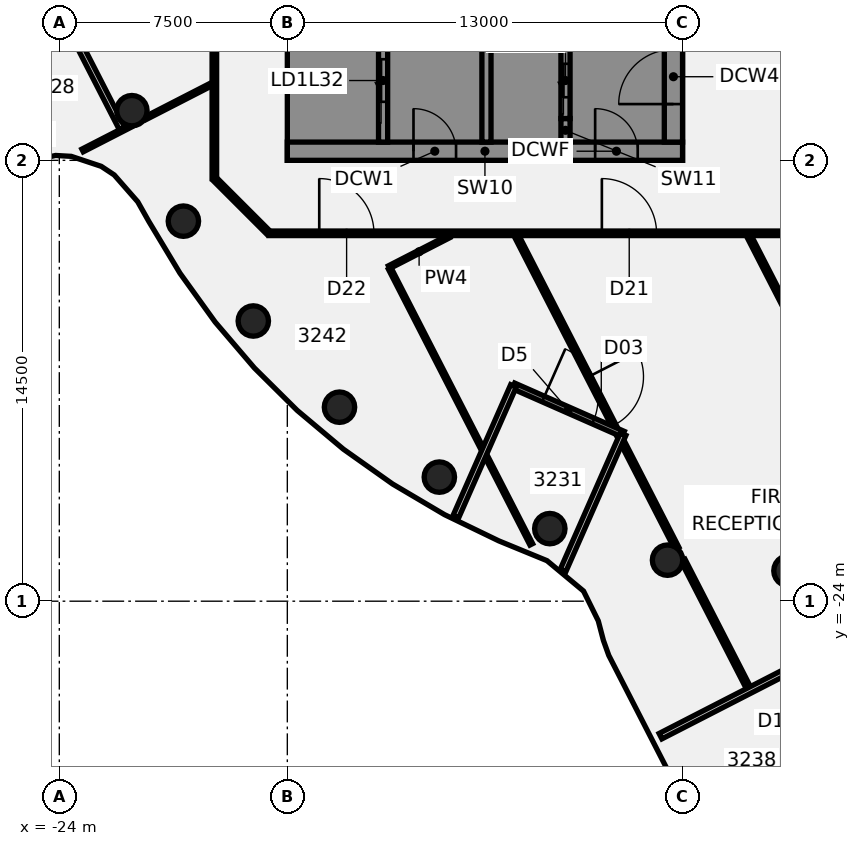
"""IFC4 building model, lengths in metres.
Left out: names, types, materials, properties, quantities, classifications, styles, units other than length and angle.
Written with IfcOpenShell. Run it as: python <this file> out.ifc"""

import sys

from ifc_helpers import new_model, si_unit, direction, frame, frame_2d, origin, origin_2d, place, context, subcontext, project, spatial, polyline, rectangle, circle, outline, extrude, element, fill, save


model = new_model("IFC4")
c1 = context("Model", 3, precision=1e-05, world=origin(), true_north=direction((0.0, 1.0)))
c2 = subcontext(c1, "Body", "Model", "MODEL_VIEW")
j1 = project(units=[si_unit("LENGTHUNIT", "METRE"), si_unit("PLANEANGLEUNIT", "RADIAN")], contexts=[c1])
p1 = place(None, origin())
s1 = spatial("IfcSite", under=j1, at=p1, CompositionType="ELEMENT")
p2 = place(p1, origin())
s2 = spatial("IfcBuilding", under=s1, at=p2, CompositionType="ELEMENT")
p3 = place(p2, frame((0.0, 0.0, 133.0)))
s3 = spatial("IfcBuildingStorey", under=s2, at=p3, CompositionType="ELEMENT", Elevation=133.0)
for number, where, z_axis, x_axis in (
    (1, (-21.613, -7.866, -0.14), (0.0, 0.0, 1.0), (1.0, 0.0, 0.0)),
    (2, (-19.919, -11.5, -0.14), (0.0, 0.0, 1.0), (1.0, 0.0, 0.0)),
    (3, (-17.619, -14.784, -0.14), (0.0, 0.0, 1.0), (1.0, 0.0, 0.0)),
    (4, (-14.784, -17.619, -0.14), (0.0, 0.0, 1.0), (1.0, 0.0, 0.0)),
    (5, (-11.5, -19.919, -0.14), (0.0, 0.0, 1.0), (1.0, 0.0, 0.0)),
    (6, (-7.866, -21.613, -0.14), (0.0, 0.0, 1.0), (1.0, 0.0, 0.0)),
    (7, (-3.994, -22.651, -0.14), (0.0, 0.0, 1.0), (1.0, 0.0, 0.0)),
    (8, (0.0, -23.0, -0.14), (0.0, 0.0, 1.0), (1.0, 0.0, 0.0)),
):
    element("IfcColumn", number, at=place(p3, frame(where, z_axis=z_axis, x_axis=x_axis)), inside=s3, PredefinedType="COLUMN", context=c2, shape_type="SweptSolid", body=[
        extrude(circle(Radius=0.5, at=origin_2d()), origin(), (0.0, 0.0, 1.0), 3.75),
    ])
p4 = place(p3, frame((-28.439, 4.225, 0.0), z_axis=(0.0, 0.0, 1.0), x_axis=(0.456564117727, -0.889690511585, 0.0)))
e9 = element("IfcWall", 9, at=p4, inside=s3, PredefinedType="PARTITIONING", context=c2, shape_type="SweptSolid", body=[
    extrude(rectangle(XDim=14.24, YDim=0.2, at=frame_2d((7.12, 0.0))), origin(), (0.0, 0.0, 1.0), 3.01),
])
p5 = place(p4, frame((5.799, 0.0, 0.0)))
e10 = element("IfcOpeningElement", 10, at=p5, cuts=e9, PredefinedType="OPENING", context=c2, shape_type="SweptSolid", body=[
    extrude(rectangle(XDim=1.4, YDim=2.1, at=frame_2d((0.7, 1.05))), frame((0.0, 0.11, 0.0), z_axis=(0.0, -1.0, 0.0), x_axis=(1.0, 0.0, 0.0)), (0.0, 0.0, 1.0), 0.22),
])
p6 = place(p3, frame((-13.13, -13.059, 0.0), z_axis=(0.0, 0.0, 1.0), x_axis=(0.456518382735, -0.88971398001, 0.0)))
e11 = element("IfcWall", 11, at=p6, inside=s3, PredefinedType="PARTITIONING", context=c2, shape_type="SweptSolid", body=[
    extrude(rectangle(XDim=10.196, YDim=0.1, at=frame_2d((5.098, 0.0))), origin(), (0.0, 0.0, 1.0), 3.01),
])
p7 = place(p3, frame((-8.956, -11.993, 0.0), z_axis=(0.0, 0.0, 1.0), x_axis=(0.456540854067, -0.889702449456, 0.0)))
e12 = element("IfcWall", 12, at=p7, inside=s3, PredefinedType="PARTITIONING", context=c2, shape_type="SweptSolid", body=[
    extrude(rectangle(XDim=11.539, YDim=0.15, at=frame_2d((5.77, 0.0))), origin(), (0.0, 0.0, 1.0), 3.01),
])
p8 = place(p7, frame((5.195, 0.0, 0.0)))
e13 = element("IfcOpeningElement", 13, at=p8, cuts=e12, PredefinedType="OPENING", context=c2, shape_type="SweptSolid", body=[
    extrude(rectangle(XDim=1.8, YDim=2.1, at=frame_2d((0.9, 1.05))), frame((0.0, 0.085, 0.0), z_axis=(0.0, -1.0, 0.0), x_axis=(1.0, 0.0, 0.0)), (0.0, 0.0, 1.0), 0.17),
])
p9 = place(p3, frame((-3.485, -22.655, 0.0), z_axis=(0.0, 0.0, 1.0), x_axis=(0.456522971759, -0.889711625335, 0.0)))
e14 = element("IfcWall", 14, at=p9, inside=s3, PredefinedType="PARTITIONING", context=c2, shape_type="SweptSolid", body=[
    extrude(rectangle(XDim=4.708, YDim=0.15, at=frame_2d((2.354, 0.0))), origin(), (0.0, 0.0, 1.0), 3.01),
])
p10 = place(p3, frame((-1.313, -11.993, 0.0), z_axis=(0.0, 0.0, 1.0), x_axis=(0.456517816725, -0.889714270433, 0.0)))
e15 = element("IfcWall", 15, at=p10, inside=s3, PredefinedType="PARTITIONING", context=c2, shape_type="SweptSolid", body=[
    extrude(rectangle(XDim=11.432, YDim=0.15, at=frame_2d((5.716, 0.0))), origin(), (0.0, 0.0, 1.0), 3.01),
])
p11 = place(p10, frame((3.645, 0.0, 0.0)))
e16 = element("IfcOpeningElement", 16, at=p11, cuts=e15, PredefinedType="OPENING", context=c2, shape_type="SweptSolid", body=[
    extrude(rectangle(XDim=0.9, YDim=2.1, at=frame_2d((0.45, 1.05))), frame((0.0, 0.085, 0.0), z_axis=(0.0, -1.0, 0.0), x_axis=(1.0, 0.0, 0.0)), (0.0, 0.0, 1.0), 0.17),
])
p12 = place(p3, frame((-18.872, -10.128, 0.0), z_axis=(0.0, 0.0, 1.0), x_axis=(0.707106781187, -0.707106781187, 0.0)))
e17 = element("IfcWall", 17, at=p12, inside=s3, PredefinedType="PARTITIONING", context=c2, shape_type="SweptSolid", body=[
    extrude(rectangle(XDim=2.465, YDim=0.15, at=frame_2d((1.232, 0.0))), origin(), (0.0, 0.0, 1.0), 3.01),
])
p13 = place(p3, frame((-17.1, -11.9, 0.0), z_axis=(0.0, 0.0, 1.0), x_axis=(1.0, 0.0, 0.0)))
e18 = element("IfcWall", 18, at=p13, inside=s3, PredefinedType="PARTITIONING", context=c2, shape_type="SweptSolid", body=[
    extrude(rectangle(XDim=34.165, YDim=0.15, at=frame_2d((17.083, 0.0))), origin(), (0.0, 0.0, 1.0), 3.01),
])
p14 = place(p13, frame((10.946, 0.0, 0.0)))
e19 = element("IfcOpeningElement", 19, at=p14, cuts=e18, PredefinedType="OPENING", context=c2, shape_type="SweptSolid", body=[
    extrude(rectangle(XDim=1.8, YDim=2.1, at=frame_2d((0.9, 1.05))), frame((0.0, 0.085, 0.0), z_axis=(0.0, -1.0, 0.0), x_axis=(1.0, 0.0, 0.0)), (0.0, 0.0, 1.0), 0.17),
])
p15 = place(p13, frame((1.65, 0.0, 0.0)))
e20 = element("IfcOpeningElement", 20, at=p15, cuts=e18, PredefinedType="OPENING", context=c2, shape_type="SweptSolid", body=[
    extrude(rectangle(XDim=1.8, YDim=2.1, at=frame_2d((0.9, 1.05))), frame((0.0, 0.085, 0.0), z_axis=(0.0, -1.0, 0.0), x_axis=(1.0, 0.0, 0.0)), (0.0, 0.0, 1.0), 0.17),
])
p16 = place(p13, frame((26.309, 0.0, 0.0)))
e21 = element("IfcOpeningElement", 21, at=p16, cuts=e18, PredefinedType="OPENING", context=c2, shape_type="SweptSolid", body=[
    extrude(rectangle(XDim=1.8, YDim=2.1, at=frame_2d((0.9, 1.05))), frame((0.0, 0.085, 0.0), z_axis=(0.0, -1.0, 0.0), x_axis=(1.0, 0.0, 0.0)), (0.0, 0.0, 1.0), 0.17),
])
p17 = place(p3, frame((-23.235, -9.176, 0.0), z_axis=(0.0, 0.0, 1.0), x_axis=(0.889731557273, 0.456484124578, 0.0)))
e22 = element("IfcWall", 22, at=p17, inside=s3, PredefinedType="PARTITIONING", context=c2, shape_type="SweptSolid", body=[
    extrude(rectangle(XDim=1.776, YDim=0.1, at=frame_2d((0.888, 0.0))), origin(), (0.0, 0.0, 1.0), 3.01),
])
p18 = place(p3, frame((-21.17, -8.116, 0.0), z_axis=(0.0, 0.0, 1.0), x_axis=(0.889716227949, 0.456514001675, 0.0)))
e23 = element("IfcWall", 23, at=p18, inside=s3, PredefinedType="PARTITIONING", context=c2, shape_type="SweptSolid", body=[
    extrude(rectangle(XDim=2.461, YDim=0.1, at=frame_2d((1.23, 0.0))), origin(), (0.0, 0.0, 1.0), 3.01),
])
p19 = place(p3, frame((-13.153, -13.014, 0.0), z_axis=(0.0, 0.0, 1.0), x_axis=(0.889738452246, 0.456470685363, 0.0)))
e24 = element("IfcWall", 24, at=p19, inside=s3, PredefinedType="PARTITIONING", context=c2, shape_type="SweptSolid", body=[
    extrude(rectangle(XDim=2.22, YDim=0.1, at=frame_2d((1.11, 0.0))), origin(), (0.0, 0.0, 1.0), 3.01),
])
p20 = place(p3, frame((-4.225, -28.439, 0.0), z_axis=(0.0, 0.0, 1.0), x_axis=(0.889694266908, 0.456556799787, 0.0)))
e25 = element("IfcWall", 25, at=p20, inside=s3, PredefinedType="PARTITIONING", context=c2, shape_type="SweptSolid", body=[
    extrude(rectangle(XDim=14.219, YDim=0.2, at=frame_2d((7.11, 0.0))), origin(), (0.0, 0.0, 1.0), 3.01),
])
p21 = place(p20, frame((6.099, 0.0, 0.0)))
e26 = element("IfcOpeningElement", 26, at=p21, cuts=e25, PredefinedType="OPENING", context=c2, shape_type="SweptSolid", body=[
    extrude(rectangle(XDim=1.4, YDim=2.1, at=frame_2d((0.7, 1.05))), frame((0.0, 0.11, 0.0), z_axis=(0.0, -1.0, 0.0), x_axis=(1.0, 0.0, 0.0)), (0.0, 0.0, 1.0), 0.22),
])
p22 = place(p3, frame((-18.9, -10.1, 0.0), z_axis=(0.0, 0.0, 1.0), x_axis=(0.0, 1.0, 0.0)))
e27 = element("IfcWall", 27, at=p22, inside=s3, PredefinedType="PARTITIONING", context=c2, shape_type="SweptSolid", body=[
    extrude(rectangle(XDim=20.2, YDim=0.15, at=frame_2d((10.1, 0.0))), origin(), (0.0, 0.0, 1.0), 3.01),
])
p23 = place(p22, frame((11.619, 0.0, 0.0)))
e28 = element("IfcOpeningElement", 28, at=p23, cuts=e27, PredefinedType="OPENING", context=c2, shape_type="SweptSolid", body=[
    extrude(rectangle(XDim=1.8, YDim=2.1, at=frame_2d((0.9, 1.05))), frame((0.0, 0.085, 0.0), z_axis=(0.0, -1.0, 0.0), x_axis=(1.0, 0.0, 0.0)), (0.0, 0.0, 1.0), 0.17),
])
p24 = place(p22, frame((4.499, 0.0, 0.0)))
e29 = element("IfcOpeningElement", 29, at=p24, cuts=e27, PredefinedType="OPENING", context=c2, shape_type="SweptSolid", body=[
    extrude(rectangle(XDim=0.9, YDim=2.1, at=frame_2d((0.45, 1.05))), frame((0.0, 0.085, 0.0), z_axis=(0.0, -1.0, 0.0), x_axis=(1.0, 0.0, 0.0)), (0.0, 0.0, 1.0), 0.17),
])
p25 = place(p3, frame((-9.061, -16.918, 0.0), z_axis=(0.0, 0.0, 1.0), x_axis=(0.915163294104, -0.403083297999, 0.0)))
e30 = element("IfcWall", 30, at=p25, inside=s3, PredefinedType="SOLIDWALL", context=c2, shape_type="SweptSolid", body=[
    extrude(rectangle(XDim=3.94, YDim=0.2, at=frame_2d((1.97, 0.0))), origin(), (0.0, 0.0, 1.0), 3.61),
])
p26 = place(p25, frame((1.07, 0.0, 0.0)))
e31 = element("IfcOpeningElement", 31, at=p26, cuts=e30, PredefinedType="OPENING", context=c2, shape_type="SweptSolid", body=[
    extrude(rectangle(XDim=1.8, YDim=2.4, at=frame_2d((0.9, 1.2))), frame((0.0, 0.11, 0.0), z_axis=(0.0, -1.0, 0.0), x_axis=(1.0, 0.0, 0.0)), (0.0, 0.0, 1.0), 0.22),
])
p27 = place(p3, frame((-9.062, -16.918, 0.0), z_axis=(0.0, 0.0, 1.0), x_axis=(-0.40309695737, -0.915157277717, 0.0)))
e32 = element("IfcWall", 32, at=p27, inside=s3, PredefinedType="SOLIDWALL", context=c2, shape_type="SweptSolid", body=[
    extrude(rectangle(XDim=4.703, YDim=0.2, at=frame_2d((2.352, 0.0))), origin(), (0.0, 0.0, 1.0), 3.61),
])
p28 = place(p3, frame((-5.456, -18.506, 0.0), z_axis=(0.0, 0.0, 1.0), x_axis=(-0.403071348588, -0.915168557124, 0.0)))
e33 = element("IfcWall", 33, at=p28, inside=s3, PredefinedType="SOLIDWALL", context=c2, shape_type="SweptSolid", body=[
    extrude(rectangle(XDim=4.893, YDim=0.2, at=frame_2d((2.446, 0.0))), origin(), (0.0, 0.0, 1.0), 3.61),
])
p29 = place(p3, frame((-16.5, -9.2, 0.0), z_axis=(0.0, 0.0, 1.0), x_axis=(1.0, 0.0, 0.0)))
e34 = element("IfcWall", 34, at=p29, inside=s3, PredefinedType="SHEAR", context=c2, shape_type="SweptSolid", body=[
    extrude(rectangle(XDim=13.0, YDim=0.6, at=frame_2d((6.5, 0.0))), origin(), (0.0, 0.0, 1.0), 3.61),
])
p30 = place(p29, frame((4.15, 0.0, 0.0)))
e35 = element("IfcOpeningElement", 35, at=p30, cuts=e34, PredefinedType="OPENING", context=c2, shape_type="SweptSolid", body=[
    extrude(rectangle(XDim=1.4, YDim=2.1, at=frame_2d((0.7, 1.05))), frame((0.0, 0.31, 0.0), z_axis=(0.0, -1.0, 0.0), x_axis=(1.0, 0.0, 0.0)), (0.0, 0.0, 1.0), 0.62),
])
p31 = place(p29, frame((10.125, 0.0, 0.0)))
e36 = element("IfcOpeningElement", 36, at=p31, cuts=e34, PredefinedType="OPENING", context=c2, shape_type="SweptSolid", body=[
    extrude(rectangle(XDim=1.4, YDim=2.1, at=frame_2d((0.7, 1.05))), frame((0.0, 0.31, 0.0), z_axis=(0.0, -1.0, 0.0), x_axis=(1.0, 0.0, 0.0)), (0.0, 0.0, 1.0), 0.62),
])
p32 = place(p3, origin())
e37 = element("IfcWall", 37, at=p32, inside=s3, PredefinedType="SHEAR", context=c2, shape_type="SweptSolid", body=[
    extrude(outline(polyline([(-13.5, -8.9), (-13.5, -8.125), (-15.9, -8.125), (-15.9, -5.625), (-13.5, -5.625), (-13.5, -5.375), (-15.9, -5.375), (-15.9, -2.875), (-13.5, -2.875), (-13.5, -2.625), (-15.9, -2.625), (-15.9, -0.125), (-13.5, -0.125), (-13.5, 0.125), (-15.9, 0.125), (-15.9, 2.625), (-13.5, 2.625), (-13.5, 2.875), (-15.9, 2.875), (-15.9, 5.375), (-13.5, 5.375), (-13.5, 5.625), (-15.9, 5.625), (-15.9, 8.125), (-13.5, 8.125), (-13.5, 8.9), (-15.9, 8.9), (-16.5, 8.9), (-16.5, -8.9), (-15.9, -8.9), (-13.5, -8.9)])), origin(), (0.0, 0.0, 1.0), 3.61),
])
p33 = place(p3, origin())
e38 = element("IfcWall", 38, at=p33, inside=s3, PredefinedType="SHEAR", context=c2, shape_type="SweptSolid", body=[
    extrude(outline(polyline([(-7.5, -8.125), (-9.55, -8.125), (-9.55, -5.625), (-9.8, -5.625), (-9.8, -8.125), (-9.8, -8.9), (-7.5, -8.9), (-7.5, -8.125)])), origin(), (0.0, 0.0, 1.0), 3.61),
])
p34 = place(p3, frame((-7.35, -8.9, 0.0), z_axis=(0.0, 0.0, 1.0), x_axis=(0.0, 1.0, 0.0)))
e39 = element("IfcWall", 39, at=p34, inside=s3, PredefinedType="SHEAR", context=c2, shape_type="SweptSolid", body=[
    extrude(rectangle(XDim=0.775, YDim=0.3, at=frame_2d((0.387, 0.0))), origin(), (0.0, 0.0, 1.0), 3.61),
])
p35 = place(p3, frame((-13.35, -8.9, 0.0), z_axis=(0.0, 0.0, 1.0), x_axis=(0.0, 1.0, 0.0)))
e40 = element("IfcWall", 40, at=p35, inside=s3, PredefinedType="SHEAR", context=c2, shape_type="SweptSolid", body=[
    extrude(rectangle(XDim=17.8, YDim=0.3, at=frame_2d((8.9, 0.0))), origin(), (0.0, 0.0, 1.0), 3.61),
])
p36 = place(p35, frame((1.325, 0.0, 0.0)))
e41 = element("IfcOpeningElement", 41, at=p36, cuts=e40, PredefinedType="OPENING", context=c2, shape_type="SweptSolid", body=[
    extrude(rectangle(XDim=1.4, YDim=2.1, at=frame_2d((0.7, 1.05))), frame((0.0, 0.16, 0.0), z_axis=(0.0, -1.0, 0.0), x_axis=(1.0, 0.0, 0.0)), (0.0, 0.0, 1.0), 0.32),
])
p37 = place(p3, frame((-9.95, -8.9, 0.0), z_axis=(0.0, 0.0, 1.0), x_axis=(0.0, 1.0, 0.0)))
e42 = element("IfcWall", 42, at=p37, inside=s3, PredefinedType="SHEAR", context=c2, shape_type="SweptSolid", body=[
    extrude(rectangle(XDim=17.8, YDim=0.3, at=frame_2d((8.9, 0.0))), origin(), (0.0, 0.0, 1.0), 3.61),
])
p38 = place(p37, frame((4.175, 0.0, 0.0)))
e43 = element("IfcOpeningElement", 43, at=p38, cuts=e42, PredefinedType="OPENING", context=c2, shape_type="SweptSolid", body=[
    extrude(rectangle(XDim=1.2, YDim=2.1, at=frame_2d((0.6, 1.05))), frame((0.0, 0.16, 0.0), z_axis=(0.0, -1.0, 0.0), x_axis=(1.0, 0.0, 0.0)), (0.0, 0.0, 1.0), 0.32),
])
p39 = place(p37, frame((6.925, 0.0, 0.0)))
e44 = element("IfcOpeningElement", 44, at=p39, cuts=e42, PredefinedType="OPENING", context=c2, shape_type="SweptSolid", body=[
    extrude(rectangle(XDim=1.2, YDim=2.1, at=frame_2d((0.6, 1.05))), frame((0.0, 0.16, 0.0), z_axis=(0.0, -1.0, 0.0), x_axis=(1.0, 0.0, 0.0)), (0.0, 0.0, 1.0), 0.32),
])
p40 = place(p3, frame((-7.35, -8.125, 0.0), z_axis=(0.0, 0.0, 1.0), x_axis=(0.0, 1.0, 0.0)))
e45 = element("IfcWall", 45, at=p40, inside=s3, PredefinedType="SHEAR", context=c2, shape_type="SweptSolid", body=[
    extrude(rectangle(XDim=2.5, YDim=0.3, at=frame_2d((1.25, 0.0))), origin(), (0.0, 0.0, 1.0), 3.61),
])
p41 = place(p40, frame((0.7, 0.0, 0.0)))
e46 = element("IfcOpeningElement", 46, at=p41, cuts=e45, PredefinedType="OPENING", context=c2, shape_type="SweptSolid", body=[
    extrude(rectangle(XDim=1.1, YDim=2.1, at=frame_2d((0.55, 1.05))), frame((0.0, 0.16, 0.0), z_axis=(0.0, -1.0, 0.0), x_axis=(1.0, 0.0, 0.0)), (0.0, 0.0, 1.0), 0.32),
])
p42 = place(p3, frame((-3.8, -8.9, 0.0), z_axis=(0.0, 0.0, 1.0), x_axis=(0.0, 1.0, 0.0)))
e47 = element("IfcWall", 47, at=p42, inside=s3, PredefinedType="SHEAR", context=c2, shape_type="SweptSolid", body=[
    extrude(rectangle(XDim=17.8, YDim=0.6, at=frame_2d((8.9, 0.0))), origin(), (0.0, 0.0, 1.0), 3.61),
])
p43 = place(p42, frame((1.25, 0.0, 0.0)))
e48 = element("IfcOpeningElement", 48, at=p43, cuts=e47, PredefinedType="OPENING", context=c2, shape_type="SweptSolid", body=[
    extrude(rectangle(XDim=1.8, YDim=2.1, at=frame_2d((0.9, 1.05))), frame((0.0, 0.31, 0.0), z_axis=(0.0, -1.0, 0.0), x_axis=(1.0, 0.0, 0.0)), (0.0, 0.0, 1.0), 0.62),
])
p44 = place(p42, frame((13.8, 0.0, 0.0)))
e49 = element("IfcOpeningElement", 49, at=p44, cuts=e47, PredefinedType="OPENING", context=c2, shape_type="SweptSolid", body=[
    extrude(rectangle(XDim=1.0, YDim=2.1, at=frame_2d((0.5, 1.05))), frame((0.0, 0.31, 0.0), z_axis=(0.0, -1.0, 0.0), x_axis=(1.0, 0.0, 0.0)), (0.0, 0.0, 1.0), 0.62),
])
p45 = place(p8, frame((1.8, 0.0, 0.0), z_axis=(0.0, 0.0, 1.0), x_axis=(-1.0, 0.0, 0.0)))
e50 = element("IfcDoor", 50, at=p45, inside=s3, OperationType="DOUBLE_DOOR_SINGLE_SWING", PredefinedType="DOOR", context=c2, shape_type="SweptSolid", body=[
    extrude(rectangle(XDim=1.8, YDim=2.1, at=frame_2d((0.9, 1.05))), frame((0.0, 0.025, 0.0), z_axis=(0.0, -1.0, 0.0), x_axis=(1.0, 0.0, 0.0)), (0.0, 0.0, 1.0), 0.05),
])
fill(e13, e50)
p46 = place(p14, origin())
e51 = element("IfcDoor", 51, at=p46, inside=s3, OperationType="DOUBLE_DOOR_SINGLE_SWING", PredefinedType="DOOR", context=c2, shape_type="SweptSolid", body=[
    extrude(rectangle(XDim=1.8, YDim=2.1, at=frame_2d((0.9, 1.05))), frame((0.0, 0.025, 0.0), z_axis=(0.0, -1.0, 0.0), x_axis=(1.0, 0.0, 0.0)), (0.0, 0.0, 1.0), 0.05),
])
fill(e19, e51)
p47 = place(p15, frame((1.8, 0.0, 0.0), z_axis=(0.0, 0.0, 1.0), x_axis=(-1.0, 0.0, 0.0)))
e52 = element("IfcDoor", 52, at=p47, inside=s3, OperationType="DOUBLE_DOOR_SINGLE_SWING", PredefinedType="DOOR", context=c2, shape_type="SweptSolid", body=[
    extrude(rectangle(XDim=1.8, YDim=2.1, at=frame_2d((0.9, 1.05))), frame((0.0, 0.025, 0.0), z_axis=(0.0, -1.0, 0.0), x_axis=(1.0, 0.0, 0.0)), (0.0, 0.0, 1.0), 0.05),
])
fill(e20, e52)
p48 = place(p26, origin())
e53 = element("IfcDoor", 53, at=p48, inside=s3, OperationType="SINGLE_SWING_LEFT", PredefinedType="DOOR", context=c2, shape_type="SweptSolid", body=[
    extrude(rectangle(XDim=1.8, YDim=2.4, at=frame_2d((0.9, 1.2))), frame((0.0, 0.025, 0.0), z_axis=(0.0, -1.0, 0.0), x_axis=(1.0, 0.0, 0.0)), (0.0, 0.0, 1.0), 0.05),
])
fill(e31, e53)
p49 = place(p30, origin())
e54 = element("IfcDoor", 54, at=p49, inside=s3, OperationType="SINGLE_SWING_LEFT", PredefinedType="DOOR", context=c2, shape_type="SweptSolid", body=[
    extrude(rectangle(XDim=1.4, YDim=2.1, at=frame_2d((0.7, 1.05))), frame((0.0, 0.025, 0.0), z_axis=(0.0, -1.0, 0.0), x_axis=(1.0, 0.0, 0.0)), (0.0, 0.0, 1.0), 0.05),
])
fill(e35, e54)
p50 = place(p31, origin())
e55 = element("IfcDoor", 55, at=p50, inside=s3, OperationType="SINGLE_SWING_LEFT", PredefinedType="DOOR", context=c2, shape_type="SweptSolid", body=[
    extrude(rectangle(XDim=1.4, YDim=2.1, at=frame_2d((0.7, 1.05))), frame((0.0, 0.025, 0.0), z_axis=(0.0, -1.0, 0.0), x_axis=(1.0, 0.0, 0.0)), (0.0, 0.0, 1.0), 0.05),
])
fill(e36, e55)
p51 = place(p43, origin())
e56 = element("IfcDoor", 56, at=p51, inside=s3, OperationType="SINGLE_SWING_LEFT", PredefinedType="DOOR", context=c2, shape_type="SweptSolid", body=[
    extrude(rectangle(XDim=1.8, YDim=2.1, at=frame_2d((0.9, 1.05))), frame((0.0, 0.025, 0.0), z_axis=(0.0, -1.0, 0.0), x_axis=(1.0, 0.0, 0.0)), (0.0, 0.0, 1.0), 0.05),
])
fill(e48, e56)
p52 = place(p36, origin())
e57 = element("IfcDoor", 57, at=p52, inside=s3, OperationType="SLIDING_TO_LEFT", PredefinedType="DOOR", context=c2, shape_type="SweptSolid", body=[
    extrude(rectangle(XDim=1.4, YDim=2.1, at=frame_2d((0.7, 1.05))), frame((0.0, 0.025, 0.0), z_axis=(0.0, -1.0, 0.0), x_axis=(1.0, 0.0, 0.0)), (0.0, 0.0, 1.0), 0.05),
])
fill(e41, e57)
p53 = place(p41, origin())
e58 = element("IfcDoor", 58, at=p53, inside=s3, OperationType="SLIDING_TO_LEFT", PredefinedType="DOOR", context=c2, shape_type="SweptSolid", body=[
    extrude(rectangle(XDim=1.1, YDim=2.1, at=frame_2d((0.55, 1.05))), frame((0.0, 0.025, 0.0), z_axis=(0.0, -1.0, 0.0), x_axis=(1.0, 0.0, 0.0)), (0.0, 0.0, 1.0), 0.05),
])
fill(e46, e58)
save(model, sys.argv[1])
